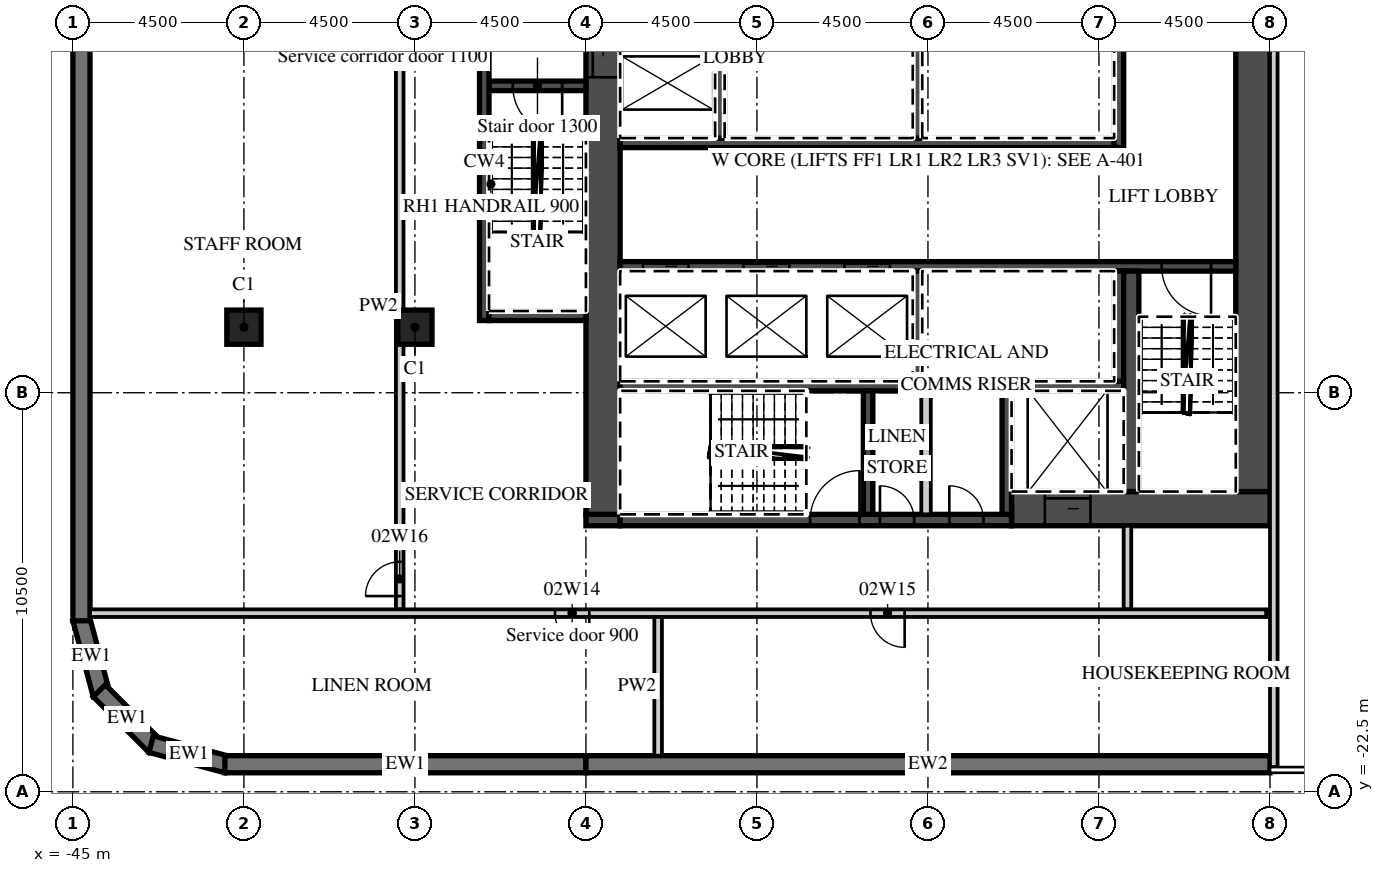
"""IFC4 building model, lengths in metres.
Left out: names, types, materials, properties, quantities, classifications, styles, units other than length and angle.
Written with IfcOpenShell. Run it as: python <this file> out.ifc"""

import sys

from ifc_helpers import new_model, si_unit, direction, frame, frame_2d, origin, origin_2d, place, context, subcontext, project, spatial, polyline, rectangle, outline, extrude, element, fill, save


model = new_model("IFC4")
c1 = context("Model", 3, precision=1e-05, world=origin(), true_north=direction((0.0, 1.0)))
c2 = subcontext(c1, "Body", "Model", "MODEL_VIEW")
j1 = project(units=[si_unit("LENGTHUNIT", "METRE"), si_unit("PLANEANGLEUNIT", "RADIAN")], contexts=[c1])
p1 = place(None, origin())
s1 = spatial("IfcSite", under=j1, at=p1, CompositionType="ELEMENT")
p2 = place(p1, origin())
s2 = spatial("IfcBuilding", under=s1, at=p2, CompositionType="ELEMENT")
p3 = place(p2, frame((0.0, 0.0, 17.0)))
s3 = spatial("IfcBuildingStorey", under=s2, at=p3, CompositionType="ELEMENT", Elevation=17.0)
for number, where, z_axis, x_axis in (
    (1, (-40.5, -10.275, 0.0), (0.0, 0.0, 1.0), (1.0, 0.0, 0.0)),
    (2, (-36.0, -10.275, 0.0), (0.0, 0.0, 1.0), (1.0, 0.0, 0.0)),
):
    element("IfcColumn", number, at=place(p3, frame(where, z_axis=z_axis, x_axis=x_axis)), inside=s3, PredefinedType="COLUMN", context=c2, shape_type="SweptSolid", body=[
        extrude(rectangle(XDim=0.9, YDim=0.9, at=origin_2d()), origin(), (0.0, 0.0, 1.0), 6.5),
    ])
p4 = place(p3, frame((-44.783, -17.942, 0.0), z_axis=(0.0, 0.0, 1.0), x_axis=(0.25881466832, -0.965926999034, 0.0)))
e3 = element("IfcWall", 3, at=p4, inside=s3, PredefinedType="SOLIDWALL", context=c2, shape_type="SweptSolid", body=[
    extrude(outline(polyline([(0.0, -0.225), (2.071, -0.225), (1.95, 0.225), (0.121, 0.225), (0.0, -0.225)])), origin(), (0.0, 0.0, 1.0), 6.05),
])
p5 = place(p3, frame((-44.305, -19.841, 0.0), z_axis=(0.0, 0.0, 1.0), x_axis=(0.707106781187, -0.707106781187, 0.0)))
e4 = element("IfcWall", 4, at=p5, inside=s3, PredefinedType="SOLIDWALL", context=c2, shape_type="SweptSolid", body=[
    extrude(outline(polyline([(0.0, -0.225), (2.071, -0.225), (1.95, 0.225), (0.121, 0.225), (0.0, -0.225)])), origin(), (0.0, 0.0, 1.0), 6.05),
])
p6 = place(p3, frame((-42.942, -21.247, 0.0), z_axis=(0.0, 0.0, 1.0), x_axis=(0.965926999034, -0.25881466832, 0.0)))
e5 = element("IfcWall", 5, at=p6, inside=s3, PredefinedType="SOLIDWALL", context=c2, shape_type="SweptSolid", body=[
    extrude(outline(polyline([(-0.0, -0.225), (2.07, -0.225), (1.95, 0.225), (0.12, 0.225), (-0.0, -0.225)])), origin(), (0.0, 0.0, 1.0), 6.05),
])
p7 = place(p3, frame((-41.0, -21.775, 0.0), z_axis=(0.0, 0.0, 1.0), x_axis=(1.0, 0.0, 0.0)))
e6 = element("IfcWall", 6, at=p7, inside=s3, PredefinedType="SOLIDWALL", context=c2, shape_type="SweptSolid", body=[
    extrude(rectangle(XDim=9.5, YDim=0.45, at=frame_2d((4.75, 0.0))), origin(), (0.0, 0.0, 1.0), 6.05),
])
p8 = place(p3, frame((-31.5, -21.775, 0.0), z_axis=(0.0, 0.0, 1.0), x_axis=(1.0, 0.0, 0.0)))
e7 = element("IfcWall", 7, at=p8, inside=s3, PredefinedType="SOLIDWALL", context=c2, shape_type="SweptSolid", body=[
    extrude(rectangle(XDim=18.0, YDim=0.45, at=frame_2d((9.0, 0.0))), origin(), (0.0, 0.0, 1.0), 6.05),
])
p9 = place(p3, frame((-44.775, 18.0, 0.0), z_axis=(0.0, 0.0, 1.0), x_axis=(0.0, -1.0, 0.0)))
e8 = element("IfcWall", 8, at=p9, inside=s3, PredefinedType="SOLIDWALL", context=c2, shape_type="SweptSolid", body=[
    extrude(rectangle(XDim=36.0, YDim=0.45, at=frame_2d((18.0, 0.0))), origin(), (0.0, 0.0, 1.0), 6.05),
])
p10 = place(p9, frame((4.05, 0.0, 0.9)))
e9 = element("IfcOpeningElement", 9, at=p10, cuts=e8, PredefinedType="OPENING", context=c2, shape_type="SweptSolid", body=[
    extrude(rectangle(XDim=3.0, YDim=1.8, at=frame_2d((1.5, 0.9))), frame((0.0, 0.235, 0.0), z_axis=(0.0, -1.0, 0.0), x_axis=(1.0, 0.0, 0.0)), (0.0, 0.0, 1.0), 0.47),
])
p11 = place(p3, frame((-20.3, -15.05, 0.0), z_axis=(0.0, 0.0, 1.0), x_axis=(1.0, 0.0, 0.0)))
e10 = element("IfcWall", 10, at=p11, inside=s3, PredefinedType="SHEAR", context=c2, shape_type="SweptSolid", body=[
    extrude(rectangle(XDim=6.8, YDim=0.9, at=frame_2d((3.4, 0.0))), origin(), (0.0, 0.0, 1.0), 6.05),
])
p12 = place(p11, frame((0.875, 0.0, 0.0)))
e11 = element("IfcOpeningElement", 11, at=p12, cuts=e10, PredefinedType="OPENING", context=c2, shape_type="SweptSolid", body=[
    extrude(rectangle(XDim=1.2, YDim=2.1, at=frame_2d((0.6, 1.05))), frame((0.0, 0.46, 0.0), z_axis=(0.0, -1.0, 0.0), x_axis=(1.0, 0.0, 0.0)), (0.0, 0.0, 1.0), 0.92),
])
p13 = place(p3, frame((-31.5, -15.35, 0.0), z_axis=(0.0, 0.0, 1.0), x_axis=(1.0, 0.0, 0.0)))
e12 = element("IfcWall", 12, at=p13, inside=s3, PredefinedType="SHEAR", context=c2, shape_type="SweptSolid", body=[
    extrude(rectangle(XDim=0.9, YDim=0.3, at=frame_2d((0.45, 0.0))), origin(), (0.0, 0.0, 1.0), 6.05),
])
p14 = place(p3, frame((-30.6, -15.35, 0.0), z_axis=(0.0, 0.0, 1.0), x_axis=(1.0, 0.0, 0.0)))
e13 = element("IfcWall", 13, at=p14, inside=s3, PredefinedType="SHEAR", context=c2, shape_type="SweptSolid", body=[
    extrude(rectangle(XDim=10.3, YDim=0.3, at=frame_2d((5.15, 0.0))), origin(), (0.0, 0.0, 1.0), 6.05),
])
p15 = place(p14, frame((5.0, 0.0, 0.0)))
e14 = element("IfcOpeningElement", 14, at=p15, cuts=e13, PredefinedType="OPENING", context=c2, shape_type="SweptSolid", body=[
    extrude(rectangle(XDim=1.3, YDim=2.1, at=frame_2d((0.65, 1.05))), frame((0.0, 0.16, 0.0), z_axis=(0.0, -1.0, 0.0), x_axis=(1.0, 0.0, 0.0)), (0.0, 0.0, 1.0), 0.32),
])
p16 = place(p14, frame((6.837, 0.0, 0.0)))
e15 = element("IfcOpeningElement", 15, at=p16, cuts=e13, PredefinedType="OPENING", context=c2, shape_type="SweptSolid", body=[
    extrude(rectangle(XDim=0.9, YDim=2.1, at=frame_2d((0.45, 1.05))), frame((0.0, 0.16, 0.0), z_axis=(0.0, -1.0, 0.0), x_axis=(1.0, 0.0, 0.0)), (0.0, 0.0, 1.0), 0.32),
])
p17 = place(p14, frame((8.663, 0.0, 0.0)))
e16 = element("IfcOpeningElement", 16, at=p17, cuts=e13, PredefinedType="OPENING", context=c2, shape_type="SweptSolid", body=[
    extrude(rectangle(XDim=0.9, YDim=2.1, at=frame_2d((0.45, 1.05))), frame((0.0, 0.16, 0.0), z_axis=(0.0, -1.0, 0.0), x_axis=(1.0, 0.0, 0.0)), (0.0, 0.0, 1.0), 0.32),
])
p18 = place(p3, frame((-31.05, -15.2, 0.0), z_axis=(0.0, 0.0, 1.0), x_axis=(0.0, 1.0, 0.0)))
e17 = element("IfcWall", 17, at=p18, inside=s3, PredefinedType="SHEAR", context=c2, shape_type="SweptSolid", body=[
    extrude(rectangle(XDim=12.8, YDim=0.9, at=frame_2d((6.4, 0.0))), origin(), (0.0, 0.0, 1.0), 6.05),
])
p19 = place(p18, frame((11.5, 0.0, 0.0)))
e18 = element("IfcOpeningElement", 18, at=p19, cuts=e17, PredefinedType="OPENING", context=c2, shape_type="SweptSolid", body=[
    extrude(rectangle(XDim=1.1, YDim=2.1, at=frame_2d((0.55, 1.05))), frame((0.0, 0.46, 0.0), z_axis=(0.0, -1.0, 0.0), x_axis=(1.0, 0.0, 0.0)), (0.0, 0.0, 1.0), 0.92),
])
p20 = place(p3, frame((-13.95, -14.6, 0.0), z_axis=(0.0, 0.0, 1.0), x_axis=(0.0, 1.0, 0.0)))
e19 = element("IfcWall", 19, at=p20, inside=s3, PredefinedType="SHEAR", context=c2, shape_type="SweptSolid", body=[
    extrude(rectangle(XDim=12.2, YDim=0.9, at=frame_2d((6.1, 0.0))), origin(), (0.0, 0.0, 1.0), 6.05),
])
p21 = place(p3, frame((-30.6, -5.425, 0.0), z_axis=(0.0, 0.0, 1.0), x_axis=(1.0, 0.0, 0.0)))
e20 = element("IfcWall", 20, at=p21, inside=s3, PredefinedType="SHEAR", context=c2, shape_type="SweptSolid", body=[
    extrude(rectangle(XDim=13.0, YDim=0.25, at=frame_2d((6.5, 0.0))), origin(), (0.0, 0.0, 1.0), 6.05),
])
p22 = place(p3, frame((-17.475, -5.55, 0.0), z_axis=(0.0, 0.0, 1.0), x_axis=(0.0, 1.0, 0.0)))
e21 = element("IfcWall", 21, at=p22, inside=s3, PredefinedType="SHEAR", context=c2, shape_type="SweptSolid", body=[
    extrude(rectangle(XDim=3.15, YDim=0.25, at=frame_2d((1.575, 0.0))), origin(), (0.0, 0.0, 1.0), 6.05),
])
for number, where, z_axis, x_axis in (
    (22, (-27.975, -5.3, 0.0), (0.0, 0.0, 1.0), (0.0, 1.0, 0.0)),
    (23, (-22.775, -5.3, 0.0), (0.0, 0.0, 1.0), (0.0, 1.0, 0.0)),
):
    element("IfcWall", number, at=place(p3, frame(where, z_axis=z_axis, x_axis=x_axis)), inside=s3, PredefinedType="SHEAR", context=c2, shape_type="SweptSolid", body=[
        extrude(rectangle(XDim=2.9, YDim=0.25, at=frame_2d((1.45, 0.0))), origin(), (0.0, 0.0, 1.0), 6.05),
    ])
p23 = place(p3, frame((-30.6, -8.675, 0.0), z_axis=(0.0, 0.0, 1.0), x_axis=(1.0, 0.0, 0.0)))
e24 = element("IfcWall", 24, at=p23, inside=s3, PredefinedType="SHEAR", context=c2, shape_type="SweptSolid", body=[
    extrude(rectangle(XDim=16.2, YDim=0.25, at=frame_2d((8.1, 0.0))), origin(), (0.0, 0.0, 1.0), 6.05),
])
p24 = place(p23, frame((0.6, 0.0, 0.0)))
e25 = element("IfcOpeningElement", 25, at=p24, cuts=e24, PredefinedType="OPENING", context=c2, shape_type="SweptSolid", body=[
    extrude(rectangle(XDim=1.2, YDim=2.1, at=frame_2d((0.6, 1.05))), frame((0.0, 0.135, 0.0), z_axis=(0.0, -1.0, 0.0), x_axis=(1.0, 0.0, 0.0)), (0.0, 0.0, 1.0), 0.27),
])
p25 = place(p23, frame((3.25, 0.0, 0.0)))
e26 = element("IfcOpeningElement", 26, at=p25, cuts=e24, PredefinedType="OPENING", context=c2, shape_type="SweptSolid", body=[
    extrude(rectangle(XDim=1.2, YDim=2.1, at=frame_2d((0.6, 1.05))), frame((0.0, 0.135, 0.0), z_axis=(0.0, -1.0, 0.0), x_axis=(1.0, 0.0, 0.0)), (0.0, 0.0, 1.0), 0.27),
])
p26 = place(p23, frame((5.9, 0.0, 0.0)))
e27 = element("IfcOpeningElement", 27, at=p26, cuts=e24, PredefinedType="OPENING", context=c2, shape_type="SweptSolid", body=[
    extrude(rectangle(XDim=1.2, YDim=2.1, at=frame_2d((0.6, 1.05))), frame((0.0, 0.135, 0.0), z_axis=(0.0, -1.0, 0.0), x_axis=(1.0, 0.0, 0.0)), (0.0, 0.0, 1.0), 0.27),
])
p27 = place(p23, frame((14.25, 0.0, 0.0)))
e28 = element("IfcOpeningElement", 28, at=p27, cuts=e24, PredefinedType="OPENING", context=c2, shape_type="SweptSolid", body=[
    extrude(rectangle(XDim=1.3, YDim=2.1, at=frame_2d((0.65, 1.05))), frame((0.0, 0.135, 0.0), z_axis=(0.0, -1.0, 0.0), x_axis=(1.0, 0.0, 0.0)), (0.0, 0.0, 1.0), 0.27),
])
p28 = place(p3, frame((-30.6, -11.825, 0.0), z_axis=(0.0, 0.0, 1.0), x_axis=(1.0, 0.0, 0.0)))
e29 = element("IfcWall", 29, at=p28, inside=s3, PredefinedType="SHEAR", context=c2, shape_type="SweptSolid", body=[
    extrude(rectangle(XDim=13.25, YDim=0.25, at=frame_2d((6.625, 0.0))), origin(), (0.0, 0.0, 1.0), 6.05),
])
for number, where, z_axis, x_axis in (
    (30, (-17.475, -11.7, 0.0), (0.0, 0.0, 1.0), (0.0, 1.0, 0.0)),
    (31, (-22.775, -11.7, 0.0), (0.0, 0.0, 1.0), (0.0, 1.0, 0.0)),
):
    element("IfcWall", number, at=place(p3, frame(where, z_axis=z_axis, x_axis=x_axis)), inside=s3, PredefinedType="SHEAR", context=c2, shape_type="SweptSolid", body=[
        extrude(rectangle(XDim=2.9, YDim=0.25, at=frame_2d((1.45, 0.0))), origin(), (0.0, 0.0, 1.0), 6.05),
    ])
p29 = place(p3, frame((-17.15, -14.6, 0.0), z_axis=(0.0, 0.0, 1.0), x_axis=(0.0, 1.0, 0.0)))
e32 = element("IfcWall", 32, at=p29, inside=s3, PredefinedType="SHEAR", context=c2, shape_type="SweptSolid", body=[
    extrude(rectangle(XDim=5.8, YDim=0.4, at=frame_2d((2.9, 0.0))), origin(), (0.0, 0.0, 1.0), 6.05),
])
for number, where, z_axis, x_axis in (
    (33, (-20.425, -15.2, 0.0), (0.0, 0.0, 1.0), (0.0, 1.0, 0.0)),
    (34, (-24.075, -15.2, 0.0), (0.0, 0.0, 1.0), (0.0, 1.0, 0.0)),
):
    element("IfcWall", number, at=place(p3, frame(where, z_axis=z_axis, x_axis=x_axis)), inside=s3, PredefinedType="SHEAR", context=c2, shape_type="SweptSolid", body=[
        extrude(rectangle(XDim=3.25, YDim=0.25, at=frame_2d((1.625, 0.0))), origin(), (0.0, 0.0, 1.0), 6.05),
    ])
p30 = place(p3, frame((-22.55, -15.2, 0.0), z_axis=(0.0, 0.0, 1.0), x_axis=(0.0, 1.0, 0.0)))
e35 = element("IfcWall", 35, at=p30, inside=s3, PredefinedType="PARTITIONING", context=c2, shape_type="SweptSolid", body=[
    extrude(rectangle(XDim=3.25, YDim=0.25, at=frame_2d((1.625, 0.0))), origin(), (0.0, 0.0, 1.0), 6.05),
])
p31 = place(p3, frame((-34.05, -3.925, 0.0), z_axis=(0.0, 0.0, 1.0), x_axis=(1.0, 0.0, 0.0)))
e36 = element("IfcWall", 36, at=p31, inside=s3, PredefinedType="SHEAR", context=c2, shape_type="SweptSolid", body=[
    extrude(rectangle(XDim=2.55, YDim=0.25, at=frame_2d((1.275, 0.0))), origin(), (0.0, 0.0, 1.0), 6.05),
])
p32 = place(p31, frame((0.625, 0.0, 0.0)))
e37 = element("IfcOpeningElement", 37, at=p32, cuts=e36, PredefinedType="OPENING", context=c2, shape_type="SweptSolid", body=[
    extrude(rectangle(XDim=1.3, YDim=2.1, at=frame_2d((0.65, 1.05))), frame((0.0, 0.135, 0.0), z_axis=(0.0, -1.0, 0.0), x_axis=(1.0, 0.0, 0.0)), (0.0, 0.0, 1.0), 0.27),
])
p33 = place(p3, frame((-34.175, -10.1, 0.0), z_axis=(0.0, 0.0, 1.0), x_axis=(0.0, 1.0, 0.0)))
e38 = element("IfcWall", 38, at=p33, inside=s3, PredefinedType="SHEAR", context=c2, shape_type="SweptSolid", body=[
    extrude(rectangle(XDim=8.35, YDim=0.25, at=frame_2d((4.175, 0.0))), origin(), (0.0, 0.0, 1.0), 6.05),
])
p34 = place(p3, frame((-34.05, -9.975, 0.0), z_axis=(0.0, 0.0, 1.0), x_axis=(1.0, 0.0, 0.0)))
e39 = element("IfcWall", 39, at=p34, inside=s3, PredefinedType="SHEAR", context=c2, shape_type="SweptSolid", body=[
    extrude(rectangle(XDim=2.55, YDim=0.25, at=frame_2d((1.275, 0.0))), origin(), (0.0, 0.0, 1.0), 6.05),
])
p35 = place(p3, frame((-17.25, -17.7, 0.0), z_axis=(0.0, 0.0, 1.0), x_axis=(0.0, 1.0, 0.0)))
e40 = element("IfcWall", 40, at=p35, inside=s3, PredefinedType="PARTITIONING", context=c2, shape_type="SweptSolid", body=[
    extrude(rectangle(XDim=2.2, YDim=0.2, at=frame_2d((1.1, 0.0))), origin(), (0.0, 0.0, 1.0), 6.05),
])
p36 = place(p3, frame((-36.4, -17.7, 0.0), z_axis=(0.0, 0.0, 1.0), x_axis=(0.0, 1.0, 0.0)))
e41 = element("IfcWall", 41, at=p36, inside=s3, PredefinedType="PARTITIONING", context=c2, shape_type="SweptSolid", body=[
    extrude(rectangle(XDim=15.95, YDim=0.2, at=frame_2d((7.975, 0.0))), origin(), (0.0, 0.0, 1.0), 6.05),
])
p37 = place(p36, frame((0.35, 0.0, 0.0)))
e42 = element("IfcOpeningElement", 42, at=p37, cuts=e41, PredefinedType="OPENING", context=c2, shape_type="SweptSolid", body=[
    extrude(rectangle(XDim=0.9, YDim=2.1, at=frame_2d((0.45, 1.05))), frame((0.0, 0.11, 0.0), z_axis=(0.0, -1.0, 0.0), x_axis=(1.0, 0.0, 0.0)), (0.0, 0.0, 1.0), 0.22),
])
p38 = place(p3, frame((-44.55, -17.8, 0.0), z_axis=(0.0, 0.0, 1.0), x_axis=(1.0, 0.0, 0.0)))
e43 = element("IfcWall", 43, at=p38, inside=s3, PredefinedType="PARTITIONING", context=c2, shape_type="SweptSolid", body=[
    extrude(rectangle(XDim=30.95, YDim=0.2, at=frame_2d((15.475, 0.0))), origin(), (0.0, 0.0, 1.0), 6.05),
])
p39 = place(p38, frame((12.238, 0.0, 0.0)))
e44 = element("IfcOpeningElement", 44, at=p39, cuts=e43, PredefinedType="OPENING", context=c2, shape_type="SweptSolid", body=[
    extrude(rectangle(XDim=0.9, YDim=2.1, at=frame_2d((0.45, 1.05))), frame((0.0, 0.11, 0.0), z_axis=(0.0, -1.0, 0.0), x_axis=(1.0, 0.0, 0.0)), (0.0, 0.0, 1.0), 0.22),
])
p40 = place(p38, frame((20.538, 0.0, 0.0)))
e45 = element("IfcOpeningElement", 45, at=p40, cuts=e43, PredefinedType="OPENING", context=c2, shape_type="SweptSolid", body=[
    extrude(rectangle(XDim=0.9, YDim=2.1, at=frame_2d((0.45, 1.05))), frame((0.0, 0.11, 0.0), z_axis=(0.0, -1.0, 0.0), x_axis=(1.0, 0.0, 0.0)), (0.0, 0.0, 1.0), 0.22),
])
p41 = place(p3, frame((-29.6, -21.55, 0.0), z_axis=(0.0, 0.0, 1.0), x_axis=(0.0, 1.0, 0.0)))
e46 = element("IfcWall", 46, at=p41, inside=s3, PredefinedType="PARTITIONING", context=c2, shape_type="SweptSolid", body=[
    extrude(rectangle(XDim=3.65, YDim=0.2, at=frame_2d((1.825, 0.0))), origin(), (0.0, 0.0, 1.0), 6.05),
])
p42 = place(p3, frame((-13.4, -21.85, 0.0), z_axis=(0.0, 0.0, 1.0), x_axis=(0.0, 1.0, 0.0)))
e47 = element("IfcWall", 47, at=p42, inside=s3, PredefinedType="PARTITIONING", context=c2, shape_type="SweptSolid", body=[
    extrude(rectangle(XDim=20.15, YDim=0.2, at=frame_2d((10.075, 0.0))), origin(), (0.0, 0.0, 1.0), 6.05),
])
p43 = place(p24, origin())
e48 = element("IfcDoor", 48, at=p43, inside=s3, OperationType="SLIDING_TO_LEFT", PredefinedType="DOOR", context=c2, shape_type="SweptSolid", body=[
    extrude(rectangle(XDim=1.2, YDim=2.1, at=frame_2d((0.6, 1.05))), frame((0.0, 0.025, 0.0), z_axis=(0.0, -1.0, 0.0), x_axis=(1.0, 0.0, 0.0)), (0.0, 0.0, 1.0), 0.05),
])
fill(e25, e48)
p44 = place(p25, origin())
e49 = element("IfcDoor", 49, at=p44, inside=s3, OperationType="SLIDING_TO_RIGHT", PredefinedType="DOOR", context=c2, shape_type="SweptSolid", body=[
    extrude(rectangle(XDim=1.2, YDim=2.1, at=frame_2d((0.6, 1.05))), frame((0.0, 0.025, 0.0), z_axis=(0.0, -1.0, 0.0), x_axis=(1.0, 0.0, 0.0)), (0.0, 0.0, 1.0), 0.05),
])
fill(e26, e49)
p45 = place(p26, origin())
e50 = element("IfcDoor", 50, at=p45, inside=s3, OperationType="SLIDING_TO_RIGHT", PredefinedType="DOOR", context=c2, shape_type="SweptSolid", body=[
    extrude(rectangle(XDim=1.2, YDim=2.1, at=frame_2d((0.6, 1.05))), frame((0.0, 0.025, 0.0), z_axis=(0.0, -1.0, 0.0), x_axis=(1.0, 0.0, 0.0)), (0.0, 0.0, 1.0), 0.05),
])
fill(e27, e50)
p46 = place(p12, origin())
e51 = element("IfcDoor", 51, at=p46, inside=s3, OperationType="SLIDING_TO_LEFT", PredefinedType="DOOR", context=c2, shape_type="SweptSolid", body=[
    extrude(rectangle(XDim=1.2, YDim=2.1, at=frame_2d((0.6, 1.05))), frame((0.0, 0.025, 0.0), z_axis=(0.0, -1.0, 0.0), x_axis=(1.0, 0.0, 0.0)), (0.0, 0.0, 1.0), 0.05),
])
fill(e11, e51)
p47 = place(p19, origin())
e52 = element("IfcDoor", 52, at=p47, inside=s3, OperationType="SLIDING_TO_RIGHT", PredefinedType="DOOR", context=c2, shape_type="SweptSolid", body=[
    extrude(rectangle(XDim=1.1, YDim=2.1, at=frame_2d((0.55, 1.05))), frame((0.0, 0.025, 0.0), z_axis=(0.0, -1.0, 0.0), x_axis=(1.0, 0.0, 0.0)), (0.0, 0.0, 1.0), 0.05),
])
fill(e18, e52)
p48 = place(p32, origin())
e53 = element("IfcDoor", 53, at=p48, inside=s3, OperationType="SINGLE_SWING_RIGHT", PredefinedType="DOOR", context=c2, shape_type="SweptSolid", body=[
    extrude(rectangle(XDim=1.3, YDim=2.1, at=frame_2d((0.65, 1.05))), frame((0.0, 0.025, 0.0), z_axis=(0.0, -1.0, 0.0), x_axis=(1.0, 0.0, 0.0)), (0.0, 0.0, 1.0), 0.05),
])
fill(e37, e53)
p49 = place(p27, origin())
e54 = element("IfcDoor", 54, at=p49, inside=s3, OperationType="SINGLE_SWING_RIGHT", PredefinedType="DOOR", context=c2, shape_type="SweptSolid", body=[
    extrude(rectangle(XDim=1.3, YDim=2.1, at=frame_2d((0.65, 1.05))), frame((0.0, 0.025, 0.0), z_axis=(0.0, -1.0, 0.0), x_axis=(1.0, 0.0, 0.0)), (0.0, 0.0, 1.0), 0.05),
])
fill(e28, e54)
p50 = place(p15, origin())
e55 = element("IfcDoor", 55, at=p50, inside=s3, OperationType="SINGLE_SWING_RIGHT", PredefinedType="DOOR", context=c2, shape_type="SweptSolid", body=[
    extrude(rectangle(XDim=1.3, YDim=2.1, at=frame_2d((0.65, 1.05))), frame((0.0, 0.025, 0.0), z_axis=(0.0, -1.0, 0.0), x_axis=(1.0, 0.0, 0.0)), (0.0, 0.0, 1.0), 0.05),
])
fill(e14, e55)
p51 = place(p16, origin())
e56 = element("IfcDoor", 56, at=p51, inside=s3, OperationType="SINGLE_SWING_LEFT", PredefinedType="DOOR", context=c2, shape_type="SweptSolid", body=[
    extrude(rectangle(XDim=0.9, YDim=2.1, at=frame_2d((0.45, 1.05))), frame((0.0, 0.025, 0.0), z_axis=(0.0, -1.0, 0.0), x_axis=(1.0, 0.0, 0.0)), (0.0, 0.0, 1.0), 0.05),
])
fill(e15, e56)
p52 = place(p17, origin())
e57 = element("IfcDoor", 57, at=p52, inside=s3, OperationType="SINGLE_SWING_LEFT", PredefinedType="DOOR", context=c2, shape_type="SweptSolid", body=[
    extrude(rectangle(XDim=0.9, YDim=2.1, at=frame_2d((0.45, 1.05))), frame((0.0, 0.025, 0.0), z_axis=(0.0, -1.0, 0.0), x_axis=(1.0, 0.0, 0.0)), (0.0, 0.0, 1.0), 0.05),
])
fill(e16, e57)
p53 = place(p39, origin())
e58 = element("IfcDoor", 58, at=p53, inside=s3, OperationType="SINGLE_SWING_RIGHT", PredefinedType="DOOR", context=c2, shape_type="SweptSolid", body=[
    extrude(rectangle(XDim=0.9, YDim=2.1, at=frame_2d((0.45, 1.05))), frame((0.0, 0.025, 0.0), z_axis=(0.0, -1.0, 0.0), x_axis=(1.0, 0.0, 0.0)), (0.0, 0.0, 1.0), 0.05),
])
fill(e44, e58)
p54 = place(p40, origin())
e59 = element("IfcDoor", 59, at=p54, inside=s3, OperationType="SINGLE_SWING_RIGHT", PredefinedType="DOOR", context=c2, shape_type="SweptSolid", body=[
    extrude(rectangle(XDim=0.9, YDim=2.1, at=frame_2d((0.45, 1.05))), frame((0.0, 0.025, 0.0), z_axis=(0.0, -1.0, 0.0), x_axis=(1.0, 0.0, 0.0)), (0.0, 0.0, 1.0), 0.05),
])
fill(e45, e59)
p55 = place(p37, origin())
e60 = element("IfcDoor", 60, at=p55, inside=s3, OperationType="SINGLE_SWING_LEFT", PredefinedType="DOOR", context=c2, shape_type="SweptSolid", body=[
    extrude(rectangle(XDim=0.9, YDim=2.1, at=frame_2d((0.45, 1.05))), frame((0.0, 0.025, 0.0), z_axis=(0.0, -1.0, 0.0), x_axis=(1.0, 0.0, 0.0)), (0.0, 0.0, 1.0), 0.05),
])
fill(e42, e60)
save(model, sys.argv[1])
